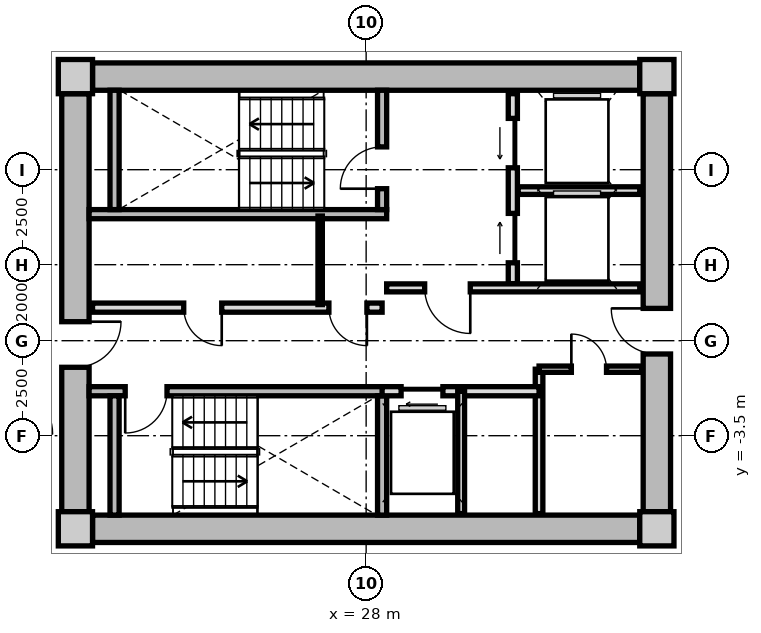
"""IFC4 building model, lengths in metres.
Left out: names, types, materials, properties, quantities, classifications, styles, units other than length and angle.
Written with IfcOpenShell. Run it as: python <this file> out.ifc"""

import sys

from ifc_helpers import new_model, si_unit, direction, frame, frame_2d, origin, origin_2d, place, context, subcontext, project, spatial, rectangle, extrude, source, transform, mapped, element, fill, save


model = new_model("IFC4")
c1 = context("Model", 3, precision=1e-05, world=origin(), true_north=direction((0.0, 1.0)))
c2 = subcontext(c1, "Body", "Model", "MODEL_VIEW")
j1 = project(units=[si_unit("LENGTHUNIT", "METRE"), si_unit("PLANEANGLEUNIT", "RADIAN")], contexts=[c1])
p1 = place(None, origin())
s1 = spatial("IfcSite", under=j1, at=p1, CompositionType="ELEMENT")
p2 = place(p1, origin())
s2 = spatial("IfcBuilding", under=s1, at=p2, CompositionType="ELEMENT")
p3 = place(p2, frame((0.0, 0.0, 117.6)))
s3 = spatial("IfcBuildingStorey", under=s2, at=p3, CompositionType="ELEMENT", Elevation=117.6)
m1 = source(origin(), c2, "Body", "SweptSolid", [
    extrude(rectangle(XDim=0.9, YDim=0.9, at=origin_2d()), origin(), (0.0, 0.0, 1.0), 3.05),
])
for number, where, z_axis, x_axis in (
    (1, (20.35, -5.95, 0.0), (0.0, 0.0, 1.0), (1.0, 0.0, 0.0)),
    (2, (35.65, -5.95, 0.0), (0.0, 0.0, 1.0), (1.0, 0.0, 0.0)),
    (3, (35.65, 5.95, 0.0), (0.0, 0.0, 1.0), (1.0, 0.0, 0.0)),
    (4, (20.35, 5.95, 0.0), (0.0, 0.0, 1.0), (1.0, 0.0, 0.0)),
):
    element("IfcColumn", number, at=place(p3, frame(where, z_axis=z_axis, x_axis=x_axis)), inside=s3, PredefinedType="COLUMN", context=c2, shape_type="MappedRepresentation", body=[
        mapped(m1, transform((0.0, 0.0, 0.0), x_axis=(1.0, 0.0, 0.0), y_axis=(0.0, 1.0, 0.0), z_axis=(0.0, 0.0, 1.0), scale=1.0)),
    ])
m2 = source(origin(), c2, "Body", "SweptSolid", [
    extrude(rectangle(XDim=14.4, YDim=0.72, at=frame_2d((7.2, 0.0))), origin(), (0.0, 0.0, 1.0), 2.79),
])
for number, where, z_axis, x_axis in (
    (5, (20.8, 5.95, 0.0), (0.0, 0.0, 1.0), (1.0, 0.0, 0.0)),
    (6, (35.2, -5.95, 0.0), (0.0, 0.0, 1.0), (-1.0, 0.0, 0.0)),
):
    element("IfcWall", number, at=place(p3, frame(where, z_axis=z_axis, x_axis=x_axis)), inside=s3, PredefinedType="SHEAR", context=c2, shape_type="MappedRepresentation", body=[
        mapped(m2, transform((0.0, 0.0, 0.0), x_axis=(1.0, 0.0, 0.0), y_axis=(0.0, 1.0, 0.0), z_axis=(0.0, 0.0, 1.0), scale=1.0)),
    ])
m3 = source(origin(), c2, "Body", "SweptSolid", [
    extrude(rectangle(XDim=11.0, YDim=0.72, at=frame_2d((5.5, 0.0))), origin(), (0.0, 0.0, 1.0), 2.79),
])
p4 = place(p3, frame((20.35, -5.5, 0.0), z_axis=(0.0, 0.0, 1.0), x_axis=(0.0, 1.0, 0.0)))
e7 = element("IfcWall", 7, at=p4, inside=s3, PredefinedType="SHEAR", context=c2, shape_type="MappedRepresentation", body=[
    mapped(m3, transform((0.0, 0.0, 0.0), x_axis=(1.0, 0.0, 0.0), y_axis=(0.0, 1.0, 0.0), z_axis=(0.0, 0.0, 1.0), scale=1.0)),
])
p5 = place(p4, frame((3.8, 0.0, 0.0)))
e8 = element("IfcOpeningElement", 8, at=p5, cuts=e7, PredefinedType="OPENING", context=c2, shape_type="SweptSolid", body=[
    extrude(rectangle(XDim=1.2, YDim=2.15, at=frame_2d((0.6, 1.075))), frame((0.0, 0.37, 0.0), z_axis=(0.0, -1.0, 0.0), x_axis=(1.0, 0.0, 0.0)), (0.0, 0.0, 1.0), 0.74),
])
p6 = place(p3, frame((35.65, 5.5, 0.0), z_axis=(0.0, 0.0, 1.0), x_axis=(0.0, -1.0, 0.0)))
e9 = element("IfcWall", 9, at=p6, inside=s3, PredefinedType="SHEAR", context=c2, shape_type="MappedRepresentation", body=[
    mapped(m3, transform((0.0, 0.0, 0.0), x_axis=(1.0, 0.0, 0.0), y_axis=(0.0, 1.0, 0.0), z_axis=(0.0, 0.0, 1.0), scale=1.0)),
])
p7 = place(p6, frame((5.65, 0.0, 0.0)))
e10 = element("IfcOpeningElement", 10, at=p7, cuts=e9, PredefinedType="OPENING", context=c2, shape_type="SweptSolid", body=[
    extrude(rectangle(XDim=1.2, YDim=2.15, at=frame_2d((0.6, 1.075))), frame((0.0, 0.37, 0.0), z_axis=(0.0, -1.0, 0.0), x_axis=(1.0, 0.0, 0.0)), (0.0, 0.0, 1.0), 0.74),
])
m4 = source(origin(), c2, "Body", "SweptSolid", [
    extrude(rectangle(XDim=7.83, YDim=0.24, at=frame_2d((3.915, 0.0))), origin(), (0.0, 0.0, 1.0), 2.79),
])
p8 = place(p3, frame((20.71, 2.33, 0.0), z_axis=(0.0, 0.0, 1.0), x_axis=(1.0, 0.0, 0.0)))
e11 = element("IfcWall", 11, at=p8, inside=s3, PredefinedType="PARTITIONING", context=c2, shape_type="MappedRepresentation", body=[
    mapped(m4, transform((0.0, 0.0, 0.0), x_axis=(1.0, 0.0, 0.0), y_axis=(0.0, 1.0, 0.0), z_axis=(0.0, 0.0, 1.0), scale=1.0)),
])
m5 = source(origin(), c2, "Body", "SweptSolid", [
    extrude(rectangle(XDim=3.14, YDim=0.24, at=frame_2d((1.57, 0.0))), origin(), (0.0, 0.0, 1.0), 2.79),
])
p9 = place(p3, frame((21.38, 2.45, 0.0), z_axis=(0.0, 0.0, 1.0), x_axis=(0.0, 1.0, 0.0)))
e12 = element("IfcWall", 12, at=p9, inside=s3, PredefinedType="PARTITIONING", context=c2, shape_type="MappedRepresentation", body=[
    mapped(m5, transform((0.0, 0.0, 0.0), x_axis=(1.0, 0.0, 0.0), y_axis=(0.0, 1.0, 0.0), z_axis=(0.0, 0.0, 1.0), scale=1.0)),
])
p10 = place(p3, frame((28.42, 2.45, 0.0), z_axis=(0.0, 0.0, 1.0), x_axis=(0.0, 1.0, 0.0)))
e13 = element("IfcWall", 13, at=p10, inside=s3, PredefinedType="PARTITIONING", context=c2, shape_type="MappedRepresentation", body=[
    mapped(m5, transform((0.0, 0.0, 0.0), x_axis=(1.0, 0.0, 0.0), y_axis=(0.0, 1.0, 0.0), z_axis=(0.0, 0.0, 1.0), scale=1.0)),
])
p11 = place(p10, frame((0.55, 0.0, 0.0)))
e14 = element("IfcOpeningElement", 14, at=p11, cuts=e13, PredefinedType="OPENING", context=c2, shape_type="SweptSolid", body=[
    extrude(rectangle(XDim=1.1, YDim=2.15, at=frame_2d((0.55, 1.075))), frame((0.0, 0.13, 0.0), z_axis=(0.0, -1.0, 0.0), x_axis=(1.0, 0.0, 0.0)), (0.0, 0.0, 1.0), 0.26),
])
p12 = place(p3, frame((20.71, -2.33, 0.0), z_axis=(0.0, 0.0, 1.0), x_axis=(1.0, 0.0, 0.0)))
e15 = element("IfcWall", 15, at=p12, inside=s3, PredefinedType="PARTITIONING", context=c2, shape_type="MappedRepresentation", body=[
    mapped(m4, transform((0.0, 0.0, 0.0), x_axis=(1.0, 0.0, 0.0), y_axis=(0.0, 1.0, 0.0), z_axis=(0.0, 0.0, 1.0), scale=1.0)),
])
p13 = place(p12, frame((0.95, 0.0, 0.0)))
e16 = element("IfcOpeningElement", 16, at=p13, cuts=e15, PredefinedType="OPENING", context=c2, shape_type="SweptSolid", body=[
    extrude(rectangle(XDim=1.1, YDim=2.15, at=frame_2d((0.55, 1.075))), frame((0.0, 0.13, 0.0), z_axis=(0.0, -1.0, 0.0), x_axis=(1.0, 0.0, 0.0)), (0.0, 0.0, 1.0), 0.26),
])
for number, where, z_axis, x_axis in (
    (17, (21.38, -5.59, 0.0), (0.0, 0.0, 1.0), (0.0, 1.0, 0.0)),
    (18, (28.42, -5.59, 0.0), (0.0, 0.0, 1.0), (0.0, 1.0, 0.0)),
):
    element("IfcWall", number, at=place(p3, frame(where, z_axis=z_axis, x_axis=x_axis)), inside=s3, PredefinedType="PARTITIONING", context=c2, shape_type="MappedRepresentation", body=[
        mapped(m5, transform((0.0, 0.0, 0.0), x_axis=(1.0, 0.0, 0.0), y_axis=(0.0, 1.0, 0.0), z_axis=(0.0, 0.0, 1.0), scale=1.0)),
    ])
m6 = source(origin(), c2, "Body", "SweptSolid", [
    extrude(rectangle(XDim=5.0, YDim=0.24, at=frame_2d((2.5, 0.0))), origin(), (0.0, 0.0, 1.0), 2.775),
])
p14 = place(p3, frame((31.86, 0.5, 0.0), z_axis=(0.0, 0.0, 1.0), x_axis=(0.0, 1.0, 0.0)))
e19 = element("IfcWall", 19, at=p14, inside=s3, PredefinedType="PARTITIONING", context=c2, shape_type="MappedRepresentation", body=[
    mapped(m6, transform((0.0, 0.0, 0.0), x_axis=(1.0, 0.0, 0.0), y_axis=(0.0, 1.0, 0.0), z_axis=(0.0, 0.0, 1.0), scale=1.0)),
])
p15 = place(p14, frame((3.05, 0.0, 0.0)))
e20 = element("IfcOpeningElement", 20, at=p15, cuts=e19, PredefinedType="OPENING", context=c2, shape_type="SweptSolid", body=[
    extrude(rectangle(XDim=1.3, YDim=2.2, at=frame_2d((0.65, 1.1))), frame((0.0, 0.13, 0.0), z_axis=(0.0, -1.0, 0.0), x_axis=(1.0, 0.0, 0.0)), (0.0, 0.0, 1.0), 0.26),
])
p16 = place(p14, frame((0.55, 0.0, 0.0)))
e21 = element("IfcOpeningElement", 21, at=p16, cuts=e19, PredefinedType="OPENING", context=c2, shape_type="SweptSolid", body=[
    extrude(rectangle(XDim=1.3, YDim=2.2, at=frame_2d((0.65, 1.1))), frame((0.0, 0.13, 0.0), z_axis=(0.0, -1.0, 0.0), x_axis=(1.0, 0.0, 0.0)), (0.0, 0.0, 1.0), 0.26),
])
m7 = source(origin(), c2, "Body", "SweptSolid", [
    extrude(rectangle(XDim=3.2, YDim=0.2, at=frame_2d((1.6, 0.0))), origin(), (0.0, 0.0, 1.0), 2.775),
])
p17 = place(p3, frame((32.0, 2.95, 0.0), z_axis=(0.0, 0.0, 1.0), x_axis=(1.0, 0.0, 0.0)))
e22 = element("IfcWall", 22, at=p17, inside=s3, PredefinedType="PARTITIONING", context=c2, shape_type="MappedRepresentation", body=[
    mapped(m7, transform((0.0, 0.0, 0.0), x_axis=(1.0, 0.0, 0.0), y_axis=(0.0, 1.0, 0.0), z_axis=(0.0, 0.0, 1.0), scale=1.0)),
])
m8 = source(origin(), c2, "Body", "SweptSolid", [
    extrude(rectangle(XDim=6.66, YDim=0.21, at=frame_2d((3.33, 0.0))), origin(), (0.0, 0.0, 1.0), 2.775),
])
p18 = place(p3, frame((28.54, 0.39, 0.0), z_axis=(0.0, 0.0, 1.0), x_axis=(1.0, 0.0, 0.0)))
e23 = element("IfcWall", 23, at=p18, inside=s3, PredefinedType="PARTITIONING", context=c2, shape_type="MappedRepresentation", body=[
    mapped(m8, transform((0.0, 0.0, 0.0), x_axis=(1.0, 0.0, 0.0), y_axis=(0.0, 1.0, 0.0), z_axis=(0.0, 0.0, 1.0), scale=1.0)),
])
p19 = place(p18, frame((1.0, 0.0, 0.0)))
e24 = element("IfcOpeningElement", 24, at=p19, cuts=e23, PredefinedType="OPENING", context=c2, shape_type="SweptSolid", body=[
    extrude(rectangle(XDim=1.2, YDim=2.15, at=frame_2d((0.6, 1.075))), frame((0.0, 0.115, 0.0), z_axis=(0.0, -1.0, 0.0), x_axis=(1.0, 0.0, 0.0)), (0.0, 0.0, 1.0), 0.23),
])
m9 = source(origin(), c2, "Body", "SweptSolid", [
    extrude(rectangle(XDim=7.62, YDim=0.24, at=frame_2d((3.81, 0.0))), origin(), (0.0, 0.0, 1.0), 2.775),
])
p20 = place(p3, frame((20.8, -0.13, 0.0), z_axis=(0.0, 0.0, 1.0), x_axis=(1.0, 0.0, 0.0)))
e25 = element("IfcWall", 25, at=p20, inside=s3, PredefinedType="PARTITIONING", context=c2, shape_type="MappedRepresentation", body=[
    mapped(m9, transform((0.0, 0.0, 0.0), x_axis=(1.0, 0.0, 0.0), y_axis=(0.0, 1.0, 0.0), z_axis=(0.0, 0.0, 1.0), scale=1.0)),
])
p21 = place(p20, frame((6.22, 0.0, 0.0)))
e26 = element("IfcOpeningElement", 26, at=p21, cuts=e25, PredefinedType="OPENING", context=c2, shape_type="SweptSolid", body=[
    extrude(rectangle(XDim=1.0, YDim=2.1, at=frame_2d((0.5, 1.05))), frame((0.0, 0.13, 0.0), z_axis=(0.0, -1.0, 0.0), x_axis=(1.0, 0.0, 0.0)), (0.0, 0.0, 1.0), 0.26),
])
p22 = place(p20, frame((2.4, 0.0, 0.0)))
e27 = element("IfcOpeningElement", 27, at=p22, cuts=e25, PredefinedType="OPENING", context=c2, shape_type="SweptSolid", body=[
    extrude(rectangle(XDim=1.0, YDim=2.1, at=frame_2d((0.5, 1.05))), frame((0.0, 0.13, 0.0), z_axis=(0.0, -1.0, 0.0), x_axis=(1.0, 0.0, 0.0)), (0.0, 0.0, 1.0), 0.26),
])
m10 = source(origin(), c2, "Body", "SweptSolid", [
    extrude(rectangle(XDim=2.33, YDim=0.115, at=frame_2d((1.165, 0.0))), origin(), (0.0, 0.0, 1.0), 2.775),
])
p23 = place(p3, frame((26.79, -0.05, 0.0), z_axis=(0.0, 0.0, 1.0), x_axis=(0.0, 1.0, 0.0)))
e28 = element("IfcWall", 28, at=p23, inside=s3, PredefinedType="PARTITIONING", context=c2, shape_type="MappedRepresentation", body=[
    mapped(m10, transform((0.0, 0.0, 0.0), x_axis=(1.0, 0.0, 0.0), y_axis=(0.0, 1.0, 0.0), z_axis=(0.0, 0.0, 1.0), scale=1.0)),
])
m11 = source(origin(), c2, "Body", "SweptSolid", [
    extrude(rectangle(XDim=3.8, YDim=0.2, at=frame_2d((1.9, 0.0))), origin(), (0.0, 0.0, 1.0), 2.775),
])
p24 = place(p3, frame((32.55, -5.55, 0.0), z_axis=(0.0, 0.0, 1.0), x_axis=(0.0, 1.0, 0.0)))
e29 = element("IfcWall", 29, at=p24, inside=s3, PredefinedType="PARTITIONING", context=c2, shape_type="MappedRepresentation", body=[
    mapped(m11, transform((0.0, 0.0, 0.0), x_axis=(1.0, 0.0, 0.0), y_axis=(0.0, 1.0, 0.0), z_axis=(0.0, 0.0, 1.0), scale=1.0)),
])
m12 = source(origin(), c2, "Body", "SweptSolid", [
    extrude(rectangle(XDim=4.13, YDim=0.24, at=frame_2d((2.065, 0.0))), origin(), (0.0, 0.0, 1.0), 2.775),
])
p25 = place(p3, frame((28.42, -2.33, 0.0), z_axis=(0.0, 0.0, 1.0), x_axis=(1.0, 0.0, 0.0)))
e30 = element("IfcWall", 30, at=p25, inside=s3, PredefinedType="PARTITIONING", context=c2, shape_type="MappedRepresentation", body=[
    mapped(m12, transform((0.0, 0.0, 0.0), x_axis=(1.0, 0.0, 0.0), y_axis=(0.0, 1.0, 0.0), z_axis=(0.0, 0.0, 1.0), scale=1.0)),
])
p26 = place(p25, frame((0.5, 0.0, 0.0)))
e31 = element("IfcOpeningElement", 31, at=p26, cuts=e30, PredefinedType="OPENING", context=c2, shape_type="SweptSolid", body=[
    extrude(rectangle(XDim=1.1, YDim=2.2, at=frame_2d((0.55, 1.1))), frame((0.0, 0.13, 0.0), z_axis=(0.0, -1.0, 0.0), x_axis=(1.0, 0.0, 0.0)), (0.0, 0.0, 1.0), 0.26),
])
m13 = source(origin(), c2, "Body", "SweptSolid", [
    extrude(rectangle(XDim=3.22, YDim=0.18, at=frame_2d((1.61, 0.0))), origin(), (0.0, 0.0, 1.0), 2.775),
])
p27 = place(p3, frame((30.5, -5.55, 0.0), z_axis=(0.0, 0.0, 1.0), x_axis=(0.0, 1.0, 0.0)))
e32 = element("IfcWall", 32, at=p27, inside=s3, PredefinedType="PARTITIONING", context=c2, shape_type="MappedRepresentation", body=[
    mapped(m13, transform((0.0, 0.0, 0.0), x_axis=(1.0, 0.0, 0.0), y_axis=(0.0, 1.0, 0.0), z_axis=(0.0, 0.0, 1.0), scale=1.0)),
])
m14 = source(origin(), c2, "Body", "SweptSolid", [
    extrude(rectangle(XDim=2.7, YDim=0.165, at=frame_2d((1.35, 0.0))), origin(), (0.0, 0.0, 1.0), 2.775),
])
p28 = place(p3, frame((32.55, -1.75, 0.0), z_axis=(0.0, 0.0, 1.0), x_axis=(1.0, 0.0, 0.0)))
e33 = element("IfcWall", 33, at=p28, inside=s3, PredefinedType="PARTITIONING", context=c2, shape_type="MappedRepresentation", body=[
    mapped(m14, transform((0.0, 0.0, 0.0), x_axis=(1.0, 0.0, 0.0), y_axis=(0.0, 1.0, 0.0), z_axis=(0.0, 0.0, 1.0), scale=1.0)),
])
p29 = place(p28, frame((0.85, 0.0, 0.0)))
e34 = element("IfcOpeningElement", 34, at=p29, cuts=e33, PredefinedType="OPENING", context=c2, shape_type="SweptSolid", body=[
    extrude(rectangle(XDim=0.925, YDim=2.1, at=frame_2d((0.462, 1.05))), frame((0.0, 0.093, 0.0), z_axis=(0.0, -1.0, 0.0), x_axis=(1.0, 0.0, 0.0)), (0.0, 0.0, 1.0), 0.185),
])
m15 = source(origin(), c2, "Body", "SweptSolid", [
    extrude(rectangle(XDim=1.1, YDim=2.15, at=frame_2d((0.55, 1.075))), frame((0.0, 0.025, 0.0), z_axis=(0.0, -1.0, 0.0), x_axis=(1.0, 0.0, 0.0)), (0.0, 0.0, 1.0), 0.05),
])
p30 = place(p11, origin())
e35 = element("IfcDoor", 35, at=p30, inside=s3, OperationType="SINGLE_SWING_LEFT", PredefinedType="DOOR", context=c2, shape_type="MappedRepresentation", body=[
    mapped(m15, transform((0.0, 0.0, 0.0), x_axis=(1.0, 0.0, 0.0), y_axis=(0.0, 1.0, 0.0), z_axis=(0.0, 0.0, 1.0), scale=1.0)),
])
fill(e14, e35)
p31 = place(p13, frame((1.1, 0.0, 0.0), z_axis=(0.0, 0.0, 1.0), x_axis=(-1.0, 0.0, 0.0)))
e36 = element("IfcDoor", 36, at=p31, inside=s3, OperationType="SINGLE_SWING_RIGHT", PredefinedType="DOOR", context=c2, shape_type="MappedRepresentation", body=[
    mapped(m15, transform((0.0, 0.0, 0.0), x_axis=(1.0, 0.0, 0.0), y_axis=(0.0, 1.0, 0.0), z_axis=(0.0, 0.0, 1.0), scale=1.0)),
])
fill(e16, e36)
m16 = source(origin(), c2, "Body", "SweptSolid", [
    extrude(rectangle(XDim=1.3, YDim=2.2, at=frame_2d((0.65, 1.1))), frame((0.0, 0.025, 0.0), z_axis=(0.0, -1.0, 0.0), x_axis=(1.0, 0.0, 0.0)), (0.0, 0.0, 1.0), 0.05),
])
p32 = place(p15, origin())
e37 = element("IfcDoor", 37, at=p32, inside=s3, OperationType="SLIDING_TO_LEFT", PredefinedType="DOOR", context=c2, shape_type="MappedRepresentation", body=[
    mapped(m16, transform((0.0, 0.0, 0.0), x_axis=(1.0, 0.0, 0.0), y_axis=(0.0, 1.0, 0.0), z_axis=(0.0, 0.0, 1.0), scale=1.0)),
])
fill(e20, e37)
p33 = place(p16, origin())
e38 = element("IfcDoor", 38, at=p33, inside=s3, OperationType="SLIDING_TO_RIGHT", PredefinedType="DOOR", context=c2, shape_type="MappedRepresentation", body=[
    mapped(m16, transform((0.0, 0.0, 0.0), x_axis=(1.0, 0.0, 0.0), y_axis=(0.0, 1.0, 0.0), z_axis=(0.0, 0.0, 1.0), scale=1.0)),
])
fill(e21, e38)
m17 = source(origin(), c2, "Body", "SweptSolid", [
    extrude(rectangle(XDim=1.2, YDim=2.15, at=frame_2d((0.6, 1.075))), frame((0.0, 0.025, 0.0), z_axis=(0.0, -1.0, 0.0), x_axis=(1.0, 0.0, 0.0)), (0.0, 0.0, 1.0), 0.05),
])
p34 = place(p19, frame((1.2, 0.0, 0.0), z_axis=(0.0, 0.0, 1.0), x_axis=(-1.0, 0.0, 0.0)))
e39 = element("IfcDoor", 39, at=p34, inside=s3, OperationType="SINGLE_SWING_LEFT", PredefinedType="DOOR", context=c2, shape_type="MappedRepresentation", body=[
    mapped(m17, transform((0.0, 0.0, 0.0), x_axis=(1.0, 0.0, 0.0), y_axis=(0.0, 1.0, 0.0), z_axis=(0.0, 0.0, 1.0), scale=1.0)),
])
fill(e24, e39)
p35 = place(p5, frame((1.2, 0.0, 0.0), z_axis=(0.0, 0.0, 1.0), x_axis=(-1.0, 0.0, 0.0)))
e40 = element("IfcDoor", 40, at=p35, inside=s3, OperationType="SINGLE_SWING_LEFT", PredefinedType="DOOR", context=c2, shape_type="MappedRepresentation", body=[
    mapped(m17, transform((0.0, 0.0, 0.0), x_axis=(1.0, 0.0, 0.0), y_axis=(0.0, 1.0, 0.0), z_axis=(0.0, 0.0, 1.0), scale=1.0)),
])
fill(e8, e40)
p36 = place(p7, frame((1.2, 0.0, 0.0), z_axis=(0.0, 0.0, 1.0), x_axis=(-1.0, 0.0, 0.0)))
e41 = element("IfcDoor", 41, at=p36, inside=s3, OperationType="SINGLE_SWING_RIGHT", PredefinedType="DOOR", context=c2, shape_type="MappedRepresentation", body=[
    mapped(m17, transform((0.0, 0.0, 0.0), x_axis=(1.0, 0.0, 0.0), y_axis=(0.0, 1.0, 0.0), z_axis=(0.0, 0.0, 1.0), scale=1.0)),
])
fill(e10, e41)
m18 = source(origin(), c2, "Body", "SweptSolid", [
    extrude(rectangle(XDim=1.0, YDim=2.1, at=frame_2d((0.5, 1.05))), frame((0.0, 0.025, 0.0), z_axis=(0.0, -1.0, 0.0), x_axis=(1.0, 0.0, 0.0)), (0.0, 0.0, 1.0), 0.05),
])
p37 = place(p21, frame((1.0, 0.0, 0.0), z_axis=(0.0, 0.0, 1.0), x_axis=(-1.0, 0.0, 0.0)))
e42 = element("IfcDoor", 42, at=p37, inside=s3, OperationType="SINGLE_SWING_LEFT", PredefinedType="DOOR", context=c2, shape_type="MappedRepresentation", body=[
    mapped(m18, transform((0.0, 0.0, 0.0), x_axis=(1.0, 0.0, 0.0), y_axis=(0.0, 1.0, 0.0), z_axis=(0.0, 0.0, 1.0), scale=1.0)),
])
fill(e26, e42)
p38 = place(p22, frame((1.0, 0.0, 0.0), z_axis=(0.0, 0.0, 1.0), x_axis=(-1.0, 0.0, 0.0)))
e43 = element("IfcDoor", 43, at=p38, inside=s3, OperationType="SINGLE_SWING_LEFT", PredefinedType="DOOR", context=c2, shape_type="MappedRepresentation", body=[
    mapped(m18, transform((0.0, 0.0, 0.0), x_axis=(1.0, 0.0, 0.0), y_axis=(0.0, 1.0, 0.0), z_axis=(0.0, 0.0, 1.0), scale=1.0)),
])
fill(e27, e43)
m19 = source(origin(), c2, "Body", "SweptSolid", [
    extrude(rectangle(XDim=1.1, YDim=2.2, at=frame_2d((0.55, 1.1))), frame((0.0, 0.025, 0.0), z_axis=(0.0, -1.0, 0.0), x_axis=(1.0, 0.0, 0.0)), (0.0, 0.0, 1.0), 0.05),
])
p39 = place(p26, frame((1.1, 0.0, 0.0), z_axis=(0.0, 0.0, 1.0), x_axis=(-1.0, 0.0, 0.0)))
e44 = element("IfcDoor", 44, at=p39, inside=s3, OperationType="SLIDING_TO_LEFT", PredefinedType="DOOR", context=c2, shape_type="MappedRepresentation", body=[
    mapped(m19, transform((0.0, 0.0, 0.0), x_axis=(1.0, 0.0, 0.0), y_axis=(0.0, 1.0, 0.0), z_axis=(0.0, 0.0, 1.0), scale=1.0)),
])
fill(e31, e44)
m20 = source(origin(), c2, "Body", "SweptSolid", [
    extrude(rectangle(XDim=0.925, YDim=2.1, at=frame_2d((0.462, 1.05))), frame((0.0, 0.025, 0.0), z_axis=(0.0, -1.0, 0.0), x_axis=(1.0, 0.0, 0.0)), (0.0, 0.0, 1.0), 0.05),
])
p40 = place(p29, origin())
e45 = element("IfcDoor", 45, at=p40, inside=s3, OperationType="SINGLE_SWING_LEFT", PredefinedType="DOOR", context=c2, shape_type="MappedRepresentation", body=[
    mapped(m20, transform((0.0, 0.0, 0.0), x_axis=(1.0, 0.0, 0.0), y_axis=(0.0, 1.0, 0.0), z_axis=(0.0, 0.0, 1.0), scale=1.0)),
])
fill(e34, e45)
save(model, sys.argv[1])
